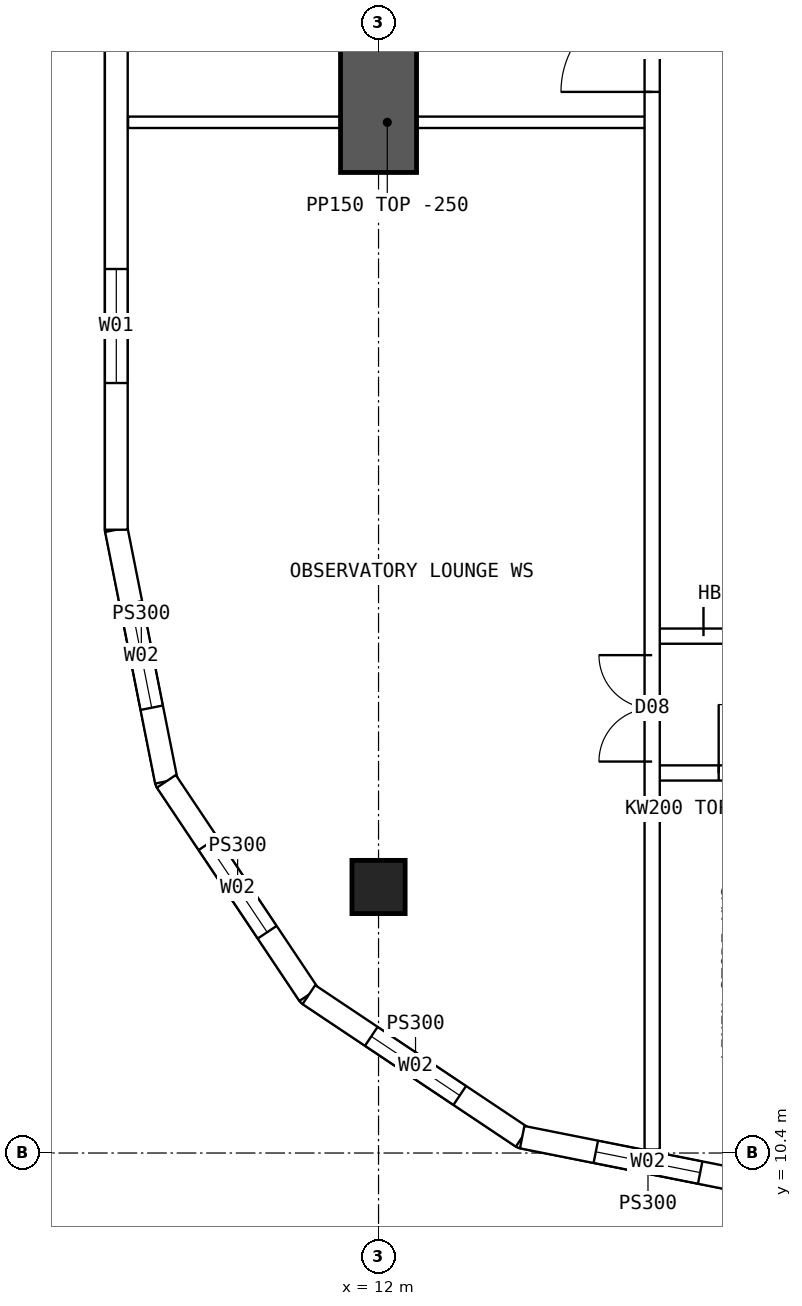
"""IFC4 building model, lengths in metres.
Left out: names, types, materials, properties, quantities, classifications, styles, units other than length and angle.
Written with IfcOpenShell. Run it as: python <this file> out.ifc"""

import sys

from ifc_helpers import new_model, si_unit, direction, frame, frame_2d, origin, origin_2d, place, context, subcontext, project, spatial, polyline, rectangle, hollow_rectangle, outline, extrude, element, fill, save


model = new_model("IFC4")
c1 = context("Model", 3, precision=1e-05, world=origin(), true_north=direction((0.0, 1.0)))
c2 = subcontext(c1, "Body", "Model", "MODEL_VIEW")
j1 = project(units=[si_unit("LENGTHUNIT", "METRE"), si_unit("PLANEANGLEUNIT", "RADIAN")], contexts=[c1])
p1 = place(None, origin())
s1 = spatial("IfcSite", under=j1, at=p1, CompositionType="ELEMENT")
p2 = place(p1, origin())
s2 = spatial("IfcBuilding", under=s1, at=p2, CompositionType="ELEMENT")
p3 = place(p2, frame((0.0, 0.0, 167.35)))
s3 = spatial("IfcBuildingStorey", under=s2, at=p3, CompositionType="ELEMENT", Elevation=167.35)
p4 = place(p3, frame((12.0, 13.9, 0.0), z_axis=(0.0, 0.0, 1.0), x_axis=(1.0, 0.0, 0.0)))
e1 = element("IfcColumn", 1, at=p4, inside=s3, PredefinedType="COLUMN", context=c2, shape_type="SweptSolid", body=[
    extrude(hollow_rectangle(XDim=0.7, YDim=0.7, WallThickness=0.07, at=origin_2d()), origin(), (0.0, 0.0, 1.0), 3.75),
])
p5 = place(p3, frame((12.0, 23.3, 0.0), z_axis=(0.0, 0.0, 1.0), x_axis=(0.0, 1.0, 0.0)))
e2 = element("IfcWall", 2, at=p5, inside=s3, PredefinedType="SHEAR", context=c2, shape_type="SweptSolid", body=[
    extrude(rectangle(XDim=5.0, YDim=1.0, at=frame_2d((2.5, 0.0))), origin(), (0.0, 0.0, 1.0), 3.75),
])
p6 = place(p3, frame((8.55, 45.4, 0.0), z_axis=(0.0, 0.0, 1.0), x_axis=(0.0, -1.0, 0.0)))
e3 = element("IfcWall", 3, at=p6, inside=s3, PredefinedType="SOLIDWALL", context=c2, shape_type="SweptSolid", body=[
    extrude(outline(polyline([(-0.015, -0.15), (26.815, -0.15), (26.785, 0.15), (0.015, 0.15), (-0.015, -0.15)])), origin(), (0.0, 0.0, 1.0), 3.5),
])
p7 = place(p6, frame((1.93, 0.0, 0.9)))
e4 = element("IfcOpeningElement", 4, at=p7, cuts=e3, PredefinedType="OPENING", context=c2, shape_type="SweptSolid", body=[
    extrude(rectangle(XDim=1.5, YDim=2.0, at=frame_2d((0.75, 1.0))), frame((0.0, 0.16, 0.0), z_axis=(0.0, -1.0, 0.0), x_axis=(1.0, 0.0, 0.0)), (0.0, 0.0, 1.0), 0.32),
])
p8 = place(p6, frame((7.29, 0.0, 0.9)))
e5 = element("IfcOpeningElement", 5, at=p8, cuts=e3, PredefinedType="OPENING", context=c2, shape_type="SweptSolid", body=[
    extrude(rectangle(XDim=1.5, YDim=2.0, at=frame_2d((0.75, 1.0))), frame((0.0, 0.16, 0.0), z_axis=(0.0, -1.0, 0.0), x_axis=(1.0, 0.0, 0.0)), (0.0, 0.0, 1.0), 0.32),
])
p9 = place(p6, frame((12.65, 0.0, 0.9)))
e6 = element("IfcOpeningElement", 6, at=p9, cuts=e3, PredefinedType="OPENING", context=c2, shape_type="SweptSolid", body=[
    extrude(rectangle(XDim=1.5, YDim=2.0, at=frame_2d((0.75, 1.0))), frame((0.0, 0.16, 0.0), z_axis=(0.0, -1.0, 0.0), x_axis=(1.0, 0.0, 0.0)), (0.0, 0.0, 1.0), 0.32),
])
p10 = place(p6, frame((18.01, 0.0, 0.9)))
e7 = element("IfcOpeningElement", 7, at=p10, cuts=e3, PredefinedType="OPENING", context=c2, shape_type="SweptSolid", body=[
    extrude(rectangle(XDim=1.5, YDim=2.0, at=frame_2d((0.75, 1.0))), frame((0.0, 0.16, 0.0), z_axis=(0.0, -1.0, 0.0), x_axis=(1.0, 0.0, 0.0)), (0.0, 0.0, 1.0), 0.32),
])
p11 = place(p6, frame((23.37, 0.0, 0.9)))
e8 = element("IfcOpeningElement", 8, at=p11, cuts=e3, PredefinedType="OPENING", context=c2, shape_type="SweptSolid", body=[
    extrude(rectangle(XDim=1.5, YDim=2.0, at=frame_2d((0.75, 1.0))), frame((0.0, 0.16, 0.0), z_axis=(0.0, -1.0, 0.0), x_axis=(1.0, 0.0, 0.0)), (0.0, 0.0, 1.0), 0.32),
])
p12 = place(p3, frame((8.55, 18.6, 0.0), z_axis=(0.0, 0.0, 1.0), x_axis=(0.19508664885, -0.980786011034, 0.0)))
e9 = element("IfcWall", 9, at=p12, inside=s3, PredefinedType="SOLIDWALL", context=c2, shape_type="SweptSolid", body=[
    extrude(outline(polyline([(-0.015, -0.15), (3.405, -0.15), (3.345, 0.15), (0.015, 0.15), (-0.015, -0.15)])), origin(), (0.0, 0.0, 1.0), 3.5),
])
p13 = place(p12, frame((0.988, 0.0, 0.9)))
e10 = element("IfcOpeningElement", 10, at=p13, cuts=e9, PredefinedType="OPENING", context=c2, shape_type="SweptSolid", body=[
    extrude(rectangle(XDim=1.4, YDim=1.8, at=frame_2d((0.7, 0.9))), frame((0.0, 0.16, 0.0), z_axis=(0.0, -1.0, 0.0), x_axis=(1.0, 0.0, 0.0)), (0.0, 0.0, 1.0), 0.32),
])
p14 = place(p3, frame((9.208, 15.29, 0.0), z_axis=(0.0, 0.0, 1.0), x_axis=(0.555534554399, -0.831493450887, 0.0)))
e11 = element("IfcWall", 11, at=p14, inside=s3, PredefinedType="SOLIDWALL", context=c2, shape_type="SweptSolid", body=[
    extrude(outline(polyline([(-0.03, -0.15), (3.405, -0.15), (3.345, 0.15), (0.03, 0.15), (-0.03, -0.15)])), origin(), (0.0, 0.0, 1.0), 3.5),
])
p15 = place(p14, frame((0.988, 0.0, 0.9)))
e12 = element("IfcOpeningElement", 12, at=p15, cuts=e11, PredefinedType="OPENING", context=c2, shape_type="SweptSolid", body=[
    extrude(rectangle(XDim=1.4, YDim=1.8, at=frame_2d((0.7, 0.9))), frame((0.0, 0.16, 0.0), z_axis=(0.0, -1.0, 0.0), x_axis=(1.0, 0.0, 0.0)), (0.0, 0.0, 1.0), 0.32),
])
p16 = place(p3, frame((11.083, 12.483, 0.0), z_axis=(0.0, 0.0, 1.0), x_axis=(0.831493450887, -0.555534554399, 0.0)))
e13 = element("IfcWall", 13, at=p16, inside=s3, PredefinedType="SOLIDWALL", context=c2, shape_type="SweptSolid", body=[
    extrude(outline(polyline([(-0.03, -0.15), (3.405, -0.15), (3.345, 0.15), (0.03, 0.15), (-0.03, -0.15)])), origin(), (0.0, 0.0, 1.0), 3.5),
])
p17 = place(p16, frame((0.988, 0.0, 0.9)))
e14 = element("IfcOpeningElement", 14, at=p17, cuts=e13, PredefinedType="OPENING", context=c2, shape_type="SweptSolid", body=[
    extrude(rectangle(XDim=1.4, YDim=1.8, at=frame_2d((0.7, 0.9))), frame((0.0, 0.16, 0.0), z_axis=(0.0, -1.0, 0.0), x_axis=(1.0, 0.0, 0.0)), (0.0, 0.0, 1.0), 0.32),
])
p18 = place(p3, frame((13.89, 10.608, 0.0), z_axis=(0.0, 0.0, 1.0), x_axis=(0.98078325777, -0.195100490205, 0.0)))
e15 = element("IfcWall", 15, at=p18, inside=s3, PredefinedType="SOLIDWALL", context=c2, shape_type="SweptSolid", body=[
    extrude(outline(polyline([(-0.03, -0.15), (3.405, -0.15), (3.345, 0.15), (0.03, 0.15), (-0.03, -0.15)])), origin(), (0.0, 0.0, 1.0), 3.5),
])
p19 = place(p18, frame((0.988, 0.0, 0.9)))
e16 = element("IfcOpeningElement", 16, at=p19, cuts=e15, PredefinedType="OPENING", context=c2, shape_type="SweptSolid", body=[
    extrude(rectangle(XDim=1.4, YDim=1.8, at=frame_2d((0.7, 0.9))), frame((0.0, 0.16, 0.0), z_axis=(0.0, -1.0, 0.0), x_axis=(1.0, 0.0, 0.0)), (0.0, 0.0, 1.0), 0.32),
])
p20 = place(p3, frame((15.6, 15.4, 0.0), z_axis=(0.0, 0.0, 1.0), x_axis=(1.0, 0.0, 0.0)))
e17 = element("IfcWall", 17, at=p20, inside=s3, PredefinedType="SOLIDWALL", context=c2, shape_type="SweptSolid", body=[
    extrude(rectangle(XDim=1.975, YDim=0.2, at=frame_2d((0.987, 0.0))), origin(), (0.0, 0.0, 1.0), 3.5),
])
p21 = place(p20, frame((0.875, 0.0, 0.0)))
e18 = element("IfcOpeningElement", 18, at=p21, cuts=e17, PredefinedType="OPENING", context=c2, shape_type="SweptSolid", body=[
    extrude(rectangle(XDim=0.9, YDim=2.1, at=frame_2d((0.45, 1.05))), frame((0.0, 0.11, 0.0), z_axis=(0.0, -1.0, 0.0), x_axis=(1.0, 0.0, 0.0)), (0.0, 0.0, 1.0), 0.22),
])
p22 = place(p3, frame((15.6, 17.2, 0.0), z_axis=(0.0, 0.0, 1.0), x_axis=(1.0, 0.0, 0.0)))
e19 = element("IfcWall", 19, at=p22, inside=s3, PredefinedType="SOLIDWALL", context=c2, shape_type="SweptSolid", body=[
    extrude(rectangle(XDim=1.975, YDim=0.2, at=frame_2d((0.987, 0.0))), origin(), (0.0, 0.0, 1.0), 3.5),
])
p23 = place(p22, frame((0.675, 0.0, 0.0)))
e20 = element("IfcOpeningElement", 20, at=p23, cuts=e19, PredefinedType="OPENING", context=c2, shape_type="SweptSolid", body=[
    extrude(rectangle(XDim=1.2, YDim=2.1, at=frame_2d((0.6, 1.05))), frame((0.0, 0.11, 0.0), z_axis=(0.0, -1.0, 0.0), x_axis=(1.0, 0.0, 0.0)), (0.0, 0.0, 1.0), 0.22),
])
p24 = place(p3, frame((15.6, 10.446, 0.0), z_axis=(0.0, 0.0, 1.0), x_axis=(0.0, 1.0, 0.0)))
e21 = element("IfcWall", 21, at=p24, inside=s3, PredefinedType="SOLIDWALL", context=c2, shape_type="SweptSolid", body=[
    extrude(rectangle(XDim=43.107, YDim=0.2, at=frame_2d((21.554, 0.0))), origin(), (0.0, 0.0, 1.0), 3.5),
])
p25 = place(p24, frame((13.914, 0.0, 0.0)))
e22 = element("IfcOpeningElement", 22, at=p25, cuts=e21, PredefinedType="OPENING", context=c2, shape_type="SweptSolid", body=[
    extrude(rectangle(XDim=1.2, YDim=2.1, at=frame_2d((0.6, 1.05))), frame((0.0, 0.11, 0.0), z_axis=(0.0, -1.0, 0.0), x_axis=(1.0, 0.0, 0.0)), (0.0, 0.0, 1.0), 0.22),
])
p26 = place(p24, frame((5.104, 0.0, 0.0)))
e23 = element("IfcOpeningElement", 23, at=p26, cuts=e21, PredefinedType="OPENING", context=c2, shape_type="SweptSolid", body=[
    extrude(rectangle(XDim=1.4, YDim=2.1, at=frame_2d((0.7, 1.05))), frame((0.0, 0.11, 0.0), z_axis=(0.0, -1.0, 0.0), x_axis=(1.0, 0.0, 0.0)), (0.0, 0.0, 1.0), 0.22),
])
p27 = place(p24, frame((36.504, 0.0, 0.0)))
e24 = element("IfcOpeningElement", 24, at=p27, cuts=e21, PredefinedType="OPENING", context=c2, shape_type="SweptSolid", body=[
    extrude(rectangle(XDim=1.4, YDim=2.1, at=frame_2d((0.7, 1.05))), frame((0.0, 0.11, 0.0), z_axis=(0.0, -1.0, 0.0), x_axis=(1.0, 0.0, 0.0)), (0.0, 0.0, 1.0), 0.22),
])
p28 = place(p3, frame((8.705, 23.96, 0.0), z_axis=(0.0, 0.0, 1.0), x_axis=(1.0, 0.0, 0.0)))
e25 = element("IfcWall", 25, at=p28, inside=s3, PredefinedType="PARTITIONING", context=c2, shape_type="SweptSolid", body=[
    extrude(rectangle(XDim=6.82, YDim=0.15, at=frame_2d((3.41, 0.0))), origin(), (0.0, 0.0, 1.0), 3.5),
])
p29 = place(p11, origin())
e26 = element("IfcWindow", 26, at=p29, inside=s3, PartitioningType="SINGLE_PANEL", PredefinedType="WINDOW", context=c2, shape_type="SweptSolid", body=[
    extrude(rectangle(XDim=1.5, YDim=2.0, at=frame_2d((0.75, 1.0))), frame((0.0, 0.03, 0.0), z_axis=(0.0, -1.0, 0.0), x_axis=(1.0, 0.0, 0.0)), (0.0, 0.0, 1.0), 0.06),
])
fill(e8, e26)
p30 = place(p13, origin())
e27 = element("IfcWindow", 27, at=p30, inside=s3, PartitioningType="SINGLE_PANEL", PredefinedType="WINDOW", context=c2, shape_type="SweptSolid", body=[
    extrude(rectangle(XDim=1.4, YDim=1.8, at=frame_2d((0.7, 0.9))), frame((0.0, 0.03, 0.0), z_axis=(0.0, -1.0, 0.0), x_axis=(1.0, 0.0, 0.0)), (0.0, 0.0, 1.0), 0.06),
])
fill(e10, e27)
p31 = place(p15, origin())
e28 = element("IfcWindow", 28, at=p31, inside=s3, PartitioningType="SINGLE_PANEL", PredefinedType="WINDOW", context=c2, shape_type="SweptSolid", body=[
    extrude(rectangle(XDim=1.4, YDim=1.8, at=frame_2d((0.7, 0.9))), frame((0.0, 0.03, 0.0), z_axis=(0.0, -1.0, 0.0), x_axis=(1.0, 0.0, 0.0)), (0.0, 0.0, 1.0), 0.06),
])
fill(e12, e28)
p32 = place(p17, origin())
e29 = element("IfcWindow", 29, at=p32, inside=s3, PartitioningType="SINGLE_PANEL", PredefinedType="WINDOW", context=c2, shape_type="SweptSolid", body=[
    extrude(rectangle(XDim=1.4, YDim=1.8, at=frame_2d((0.7, 0.9))), frame((0.0, 0.03, 0.0), z_axis=(0.0, -1.0, 0.0), x_axis=(1.0, 0.0, 0.0)), (0.0, 0.0, 1.0), 0.06),
])
fill(e14, e29)
p33 = place(p19, origin())
e30 = element("IfcWindow", 30, at=p33, inside=s3, PartitioningType="SINGLE_PANEL", PredefinedType="WINDOW", context=c2, shape_type="SweptSolid", body=[
    extrude(rectangle(XDim=1.4, YDim=1.8, at=frame_2d((0.7, 0.9))), frame((0.0, 0.03, 0.0), z_axis=(0.0, -1.0, 0.0), x_axis=(1.0, 0.0, 0.0)), (0.0, 0.0, 1.0), 0.06),
])
fill(e16, e30)
p34 = place(p23, origin())
e31 = element("IfcDoor", 31, at=p34, inside=s3, OperationType="DOUBLE_DOOR_SINGLE_SWING", PredefinedType="DOOR", context=c2, shape_type="SweptSolid", body=[
    extrude(rectangle(XDim=1.2, YDim=2.1, at=frame_2d((0.6, 1.05))), frame((0.0, 0.025, 0.0), z_axis=(0.0, -1.0, 0.0), x_axis=(1.0, 0.0, 0.0)), (0.0, 0.0, 1.0), 0.05),
])
fill(e20, e31)
p35 = place(p25, origin())
e32 = element("IfcDoor", 32, at=p35, inside=s3, OperationType="SINGLE_SWING_LEFT", PredefinedType="DOOR", context=c2, shape_type="SweptSolid", body=[
    extrude(rectangle(XDim=1.2, YDim=2.1, at=frame_2d((0.6, 1.05))), frame((0.0, 0.025, 0.0), z_axis=(0.0, -1.0, 0.0), x_axis=(1.0, 0.0, 0.0)), (0.0, 0.0, 1.0), 0.05),
])
fill(e22, e32)
p36 = place(p26, origin())
e33 = element("IfcDoor", 33, at=p36, inside=s3, OperationType="DOUBLE_DOOR_SINGLE_SWING", PredefinedType="DOOR", context=c2, shape_type="SweptSolid", body=[
    extrude(rectangle(XDim=1.4, YDim=2.1, at=frame_2d((0.7, 1.05))), frame((0.0, 0.025, 0.0), z_axis=(0.0, -1.0, 0.0), x_axis=(1.0, 0.0, 0.0)), (0.0, 0.0, 1.0), 0.05),
])
fill(e23, e33)
p37 = place(p21, origin())
e34 = element("IfcDoor", 34, at=p37, inside=s3, OperationType="SINGLE_SWING_LEFT", PredefinedType="DOOR", context=c2, shape_type="SweptSolid", body=[
    extrude(rectangle(XDim=0.9, YDim=2.1, at=frame_2d((0.45, 1.05))), frame((0.0, 0.025, 0.0), z_axis=(0.0, -1.0, 0.0), x_axis=(1.0, 0.0, 0.0)), (0.0, 0.0, 1.0), 0.05),
])
fill(e18, e34)
save(model, sys.argv[1])
